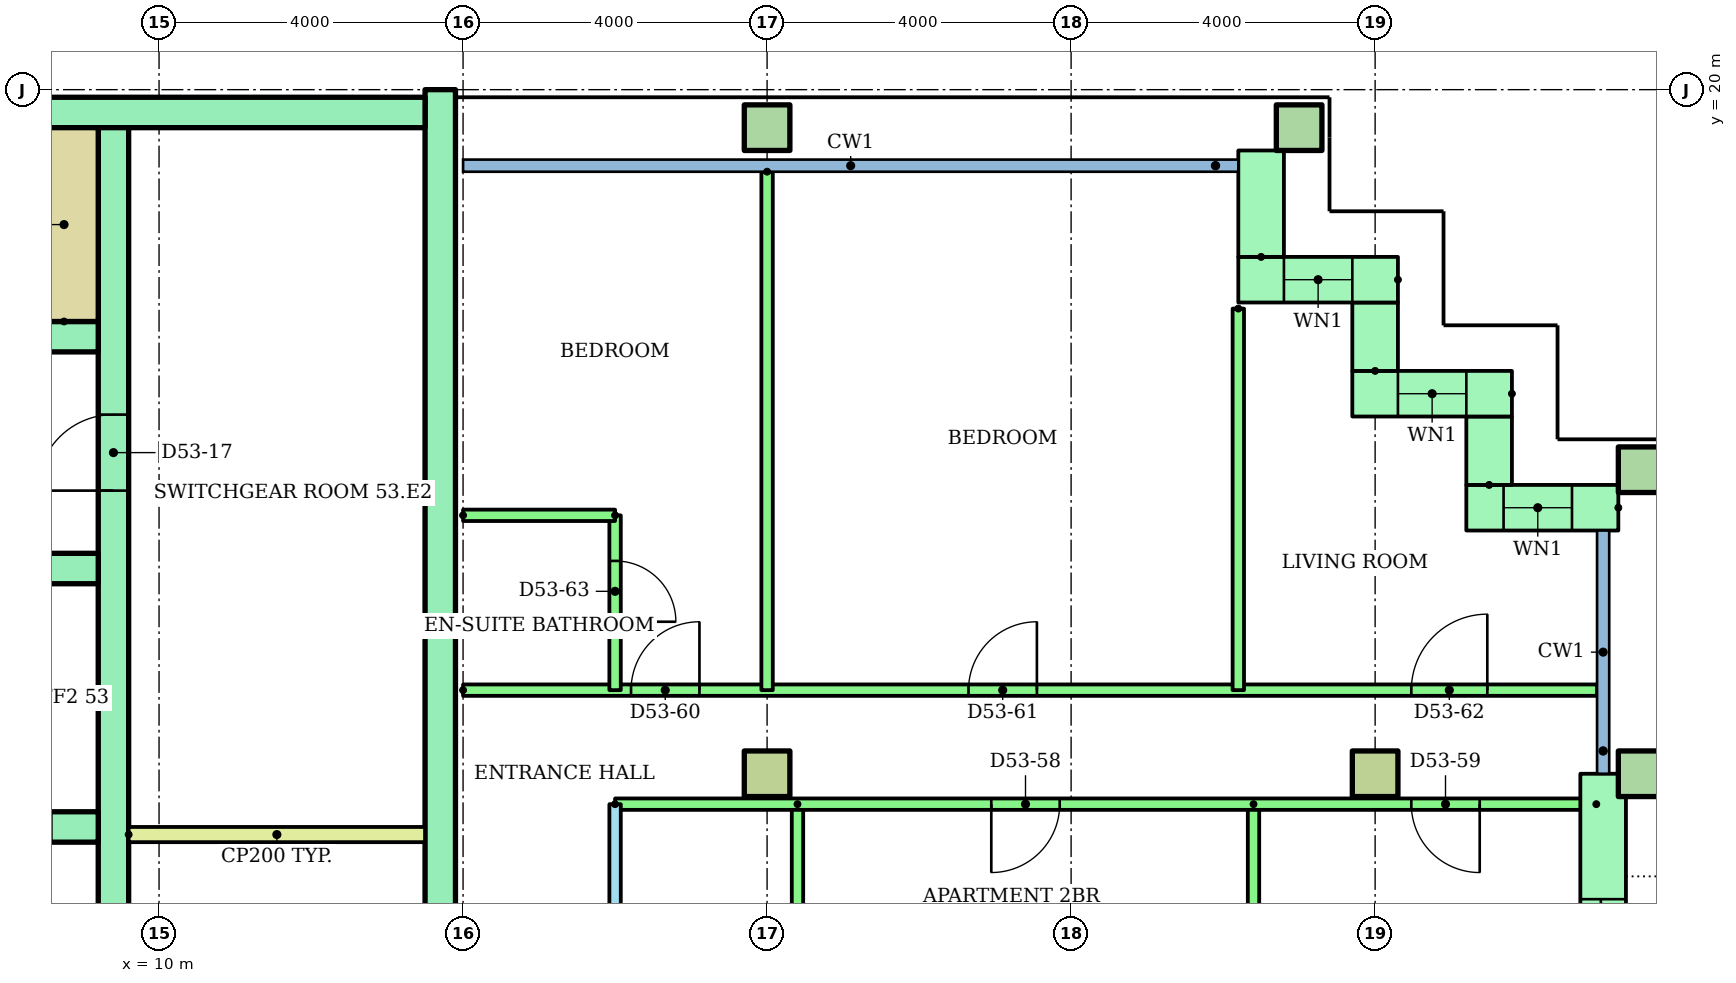
"""IFC4 building model, lengths in metres.
Left out: names, types, materials, properties, quantities, classifications, styles, units other than length and angle.
Written with IfcOpenShell. Run it as: python <this file> out.ifc"""

import sys

from ifc_helpers import new_model, si_unit, direction, frame, frame_2d, origin, origin_2d, place, context, subcontext, project, spatial, rectangle, hollow_rectangle, extrude, element, fill, save


model = new_model("IFC4")
c1 = context("Model", 3, precision=1e-05, world=origin(), true_north=direction((0.0, 1.0)))
c2 = subcontext(c1, "Body", "Model", "MODEL_VIEW")
j1 = project(units=[si_unit("LENGTHUNIT", "METRE"), si_unit("PLANEANGLEUNIT", "RADIAN")], contexts=[c1])
p1 = place(None, origin())
s1 = spatial("IfcSite", under=j1, at=p1, CompositionType="ELEMENT")
p2 = place(p1, origin())
s2 = spatial("IfcBuilding", under=s1, at=p2, CompositionType="ELEMENT")
p3 = place(p2, frame((0.0, 0.0, 207.6)))
s3 = spatial("IfcBuildingStorey", under=s2, at=p3, CompositionType="ELEMENT", Elevation=207.6)
for number, where in (
    (1, (18.0, 11.0, 0.0)),
    (2, (26.0, 11.0, 0.0)),
):
    element("IfcColumn", number, at=place(p3, frame(where)), inside=s3, PredefinedType="COLUMN", context=c2, shape_type="SweptSolid", body=[
        extrude(rectangle(XDim=0.6, YDim=0.6, at=origin_2d()), origin(), (0.0, 0.0, 1.0), 3.2),
    ])
for number, where in (
    (3, (29.5, 11.0, 0.0)),
    (4, (29.5, 15.0, 0.0)),
    (5, (18.0, 19.5, 0.0)),
    (6, (25.0, 19.5, 0.0)),
):
    element("IfcColumn", number, at=place(p3, frame(where)), inside=s3, PredefinedType="COLUMN", context=c2, shape_type="SweptSolid", body=[
        extrude(hollow_rectangle(XDim=0.6, YDim=0.6, WallThickness=0.03, at=origin_2d()), origin(), (0.0, 0.0, 1.0), 3.2),
    ])
p4 = place(p3, frame((29.2, 14.5, 0.0), z_axis=(0.0, 0.0, 1.0), x_axis=(-1.0, 0.0, 0.0)))
e7 = element("IfcWall", 7, at=p4, inside=s3, PredefinedType="STANDARD", context=c2, shape_type="SweptSolid", body=[
    extrude(rectangle(XDim=2.0, YDim=0.6, at=frame_2d((1.0, 0.0))), origin(), (0.0, 0.0, 1.0), 2.92),
])
p5 = place(p4, frame((0.61, 0.0, 0.9)))
e8 = element("IfcOpeningElement", 8, at=p5, cuts=e7, PredefinedType="OPENING", context=c2, shape_type="SweptSolid", body=[
    extrude(rectangle(XDim=0.9, YDim=1.5, at=frame_2d((0.45, 0.75))), frame((0.0, 0.31, 0.0), z_axis=(0.0, -1.0, 0.0), x_axis=(1.0, 0.0, 0.0)), (0.0, 0.0, 1.0), 0.62),
])
p6 = place(p3, frame((27.5, 14.8, 0.0), z_axis=(0.0, 0.0, 1.0), x_axis=(0.0, 1.0, 0.0)))
e9 = element("IfcWall", 9, at=p6, inside=s3, PredefinedType="STANDARD", context=c2, shape_type="SweptSolid", body=[
    extrude(rectangle(XDim=0.9, YDim=0.6, at=frame_2d((0.45, 0.0))), origin(), (0.0, 0.0, 1.0), 2.92),
])
p7 = place(p3, frame((27.8, 16.0, 0.0), z_axis=(0.0, 0.0, 1.0), x_axis=(-1.0, 0.0, 0.0)))
e10 = element("IfcWall", 10, at=p7, inside=s3, PredefinedType="STANDARD", context=c2, shape_type="SweptSolid", body=[
    extrude(rectangle(XDim=2.1, YDim=0.6, at=frame_2d((1.05, 0.0))), origin(), (0.0, 0.0, 1.0), 2.92),
])
p8 = place(p7, frame((0.6, 0.0, 0.9)))
e11 = element("IfcOpeningElement", 11, at=p8, cuts=e10, PredefinedType="OPENING", context=c2, shape_type="SweptSolid", body=[
    extrude(rectangle(XDim=0.9, YDim=1.5, at=frame_2d((0.45, 0.75))), frame((0.0, 0.31, 0.0), z_axis=(0.0, -1.0, 0.0), x_axis=(1.0, 0.0, 0.0)), (0.0, 0.0, 1.0), 0.62),
])
p9 = place(p3, frame((26.0, 16.3, 0.0), z_axis=(0.0, 0.0, 1.0), x_axis=(0.0, 1.0, 0.0)))
e12 = element("IfcWall", 12, at=p9, inside=s3, PredefinedType="STANDARD", context=c2, shape_type="SweptSolid", body=[
    extrude(rectangle(XDim=0.9, YDim=0.6, at=frame_2d((0.45, 0.0))), origin(), (0.0, 0.0, 1.0), 2.92),
])
p10 = place(p3, frame((26.3, 17.5, 0.0), z_axis=(0.0, 0.0, 1.0), x_axis=(-1.0, 0.0, 0.0)))
e13 = element("IfcWall", 13, at=p10, inside=s3, PredefinedType="STANDARD", context=c2, shape_type="SweptSolid", body=[
    extrude(rectangle(XDim=2.1, YDim=0.6, at=frame_2d((1.05, 0.0))), origin(), (0.0, 0.0, 1.0), 2.92),
])
p11 = place(p10, frame((0.6, 0.0, 0.9)))
e14 = element("IfcOpeningElement", 14, at=p11, cuts=e13, PredefinedType="OPENING", context=c2, shape_type="SweptSolid", body=[
    extrude(rectangle(XDim=0.9, YDim=1.5, at=frame_2d((0.45, 0.75))), frame((0.0, 0.31, 0.0), z_axis=(0.0, -1.0, 0.0), x_axis=(1.0, 0.0, 0.0)), (0.0, 0.0, 1.0), 0.62),
])
p12 = place(p3, frame((24.5, 17.8, 0.0), z_axis=(0.0, 0.0, 1.0), x_axis=(0.0, 1.0, 0.0)))
e15 = element("IfcWall", 15, at=p12, inside=s3, PredefinedType="STANDARD", context=c2, shape_type="SweptSolid", body=[
    extrude(rectangle(XDim=1.4, YDim=0.6, at=frame_2d((0.7, 0.0))), origin(), (0.0, 0.0, 1.0), 2.92),
])
p13 = place(p3, frame((29.0, 6.5, 0.0), z_axis=(0.0, 0.0, 1.0), x_axis=(0.0, 1.0, 0.0)))
e16 = element("IfcWall", 16, at=p13, inside=s3, PredefinedType="STANDARD", context=c2, shape_type="SweptSolid", body=[
    extrude(rectangle(XDim=4.5, YDim=0.6, at=frame_2d((2.25, 0.0))), origin(), (0.0, 0.0, 1.0), 2.92),
])
p14 = place(p13, frame((1.65, 0.0, 0.0)))
e17 = element("IfcOpeningElement", 17, at=p14, cuts=e16, PredefinedType="OPENING", context=c2, shape_type="SweptSolid", body=[
    extrude(rectangle(XDim=1.2, YDim=2.1, at=frame_2d((0.6, 1.05))), frame((0.0, 0.31, 0.0), z_axis=(0.0, -1.0, 0.0), x_axis=(1.0, 0.0, 0.0)), (0.0, 0.0, 1.0), 0.62),
])
p15 = place(p3, frame((13.7, 3.0, 0.0), z_axis=(0.0, 0.0, 1.0), x_axis=(0.0, 1.0, 0.0)))
e18 = element("IfcWall", 18, at=p15, inside=s3, PredefinedType="SHEAR", context=c2, shape_type="SweptSolid", body=[
    extrude(rectangle(XDim=17.0, YDim=0.4, at=frame_2d((8.5, 0.0))), origin(), (0.0, 0.0, 1.0), 2.92),
])
p16 = place(p3, frame((-13.5, 19.7, 0.0)))
e19 = element("IfcWall", 19, at=p16, inside=s3, PredefinedType="SHEAR", context=c2, shape_type="SweptSolid", body=[
    extrude(rectangle(XDim=27.0, YDim=0.4, at=frame_2d((13.5, 0.0))), origin(), (0.0, 0.0, 1.0), 2.92),
])
p17 = place(p3, frame((9.4, 6.8, 0.0), z_axis=(0.0, 0.0, 1.0), x_axis=(0.0, 1.0, 0.0)))
e20 = element("IfcWall", 20, at=p17, inside=s3, PredefinedType="SHEAR", context=c2, shape_type="SweptSolid", body=[
    extrude(rectangle(XDim=12.7, YDim=0.4, at=frame_2d((6.35, 0.0))), origin(), (0.0, 0.0, 1.0), 2.92),
])
p18 = place(p17, frame((1.15, 0.0, 0.0)))
e21 = element("IfcOpeningElement", 21, at=p18, cuts=e20, PredefinedType="OPENING", context=c2, shape_type="SweptSolid", body=[
    extrude(rectangle(XDim=1.0, YDim=2.1, at=frame_2d((0.5, 1.05))), frame((0.0, 0.21, 0.0), z_axis=(0.0, -1.0, 0.0), x_axis=(1.0, 0.0, 0.0)), (0.0, 0.0, 1.0), 0.42),
])
p19 = place(p17, frame((7.925, 0.0, 0.0)))
e22 = element("IfcOpeningElement", 22, at=p19, cuts=e20, PredefinedType="OPENING", context=c2, shape_type="SweptSolid", body=[
    extrude(rectangle(XDim=1.0, YDim=2.1, at=frame_2d((0.5, 1.05))), frame((0.0, 0.21, 0.0), z_axis=(0.0, -1.0, 0.0), x_axis=(1.0, 0.0, 0.0)), (0.0, 0.0, 1.0), 0.42),
])
p20 = place(p3, frame((1.2, 10.3, 0.0)))
e23 = element("IfcWall", 23, at=p20, inside=s3, PredefinedType="SHEAR", context=c2, shape_type="SweptSolid", body=[
    extrude(rectangle(XDim=8.0, YDim=0.4, at=frame_2d((4.0, 0.0))), origin(), (0.0, 0.0, 1.0), 2.92),
])
p21 = place(p20, frame((3.55, 0.0, 0.0)))
e24 = element("IfcOpeningElement", 24, at=p21, cuts=e23, PredefinedType="OPENING", context=c2, shape_type="SweptSolid", body=[
    extrude(rectangle(XDim=1.1, YDim=2.1, at=frame_2d((0.55, 1.05))), frame((0.0, 0.21, 0.0), z_axis=(0.0, -1.0, 0.0), x_axis=(1.0, 0.0, 0.0)), (0.0, 0.0, 1.0), 0.42),
])
p22 = place(p20, frame((6.283, 0.0, 0.0)))
e25 = element("IfcOpeningElement", 25, at=p22, cuts=e23, PredefinedType="OPENING", context=c2, shape_type="SweptSolid", body=[
    extrude(rectangle(XDim=1.1, YDim=2.1, at=frame_2d((0.55, 1.05))), frame((0.0, 0.21, 0.0), z_axis=(0.0, -1.0, 0.0), x_axis=(1.0, 0.0, 0.0)), (0.0, 0.0, 1.0), 0.42),
])
p23 = place(p20, frame((0.867, 0.0, 0.0)))
e26 = element("IfcOpeningElement", 26, at=p23, cuts=e23, PredefinedType="OPENING", context=c2, shape_type="SweptSolid", body=[
    extrude(rectangle(XDim=1.0, YDim=2.1, at=frame_2d((0.5, 1.05))), frame((0.0, 0.21, 0.0), z_axis=(0.0, -1.0, 0.0), x_axis=(1.0, 0.0, 0.0)), (0.0, 0.0, 1.0), 0.42),
])
p24 = place(p3, frame((1.2, 13.7, 0.0)))
e27 = element("IfcWall", 27, at=p24, inside=s3, PredefinedType="SHEAR", context=c2, shape_type="SweptSolid", body=[
    extrude(rectangle(XDim=8.0, YDim=0.4, at=frame_2d((4.0, 0.0))), origin(), (0.0, 0.0, 1.0), 2.92),
])
p25 = place(p3, frame((-9.2, 16.75, 0.0)))
e28 = element("IfcWall", 28, at=p25, inside=s3, PredefinedType="SHEAR", context=c2, shape_type="SweptSolid", body=[
    extrude(rectangle(XDim=18.4, YDim=0.4, at=frame_2d((9.2, 0.0))), origin(), (0.0, 0.0, 1.0), 2.92),
])
p26 = place(p25, frame((0.1, 0.0, 0.0)))
e29 = element("IfcOpeningElement", 29, at=p26, cuts=e28, PredefinedType="OPENING", context=c2, shape_type="SweptSolid", body=[
    extrude(rectangle(XDim=0.95, YDim=2.1, at=frame_2d((0.475, 1.05))), frame((0.0, 0.21, 0.0), z_axis=(0.0, -1.0, 0.0), x_axis=(1.0, 0.0, 0.0)), (0.0, 0.0, 1.0), 0.42),
])
p27 = place(p25, frame((6.1, 0.0, 0.0)))
e30 = element("IfcOpeningElement", 30, at=p27, cuts=e28, PredefinedType="OPENING", context=c2, shape_type="SweptSolid", body=[
    extrude(rectangle(XDim=0.95, YDim=2.1, at=frame_2d((0.475, 1.05))), frame((0.0, 0.21, 0.0), z_axis=(0.0, -1.0, 0.0), x_axis=(1.0, 0.0, 0.0)), (0.0, 0.0, 1.0), 0.42),
])
p28 = place(p25, frame((12.1, 0.0, 0.0)))
e31 = element("IfcOpeningElement", 31, at=p28, cuts=e28, PredefinedType="OPENING", context=c2, shape_type="SweptSolid", body=[
    extrude(rectangle(XDim=0.95, YDim=2.1, at=frame_2d((0.475, 1.05))), frame((0.0, 0.21, 0.0), z_axis=(0.0, -1.0, 0.0), x_axis=(1.0, 0.0, 0.0)), (0.0, 0.0, 1.0), 0.42),
])
p29 = place(p3, frame((8.75, 16.95, 0.0), z_axis=(0.0, 0.0, 1.0), x_axis=(0.0, 1.0, 0.0)))
e32 = element("IfcWall", 32, at=p29, inside=s3, PredefinedType="SHEAR", context=c2, shape_type="SweptSolid", body=[
    extrude(rectangle(XDim=2.55, YDim=0.9, at=frame_2d((1.275, 0.0))), origin(), (0.0, 0.0, 1.0), 2.92),
])
p30 = place(p3, frame((9.6, 10.2, 0.0)))
e33 = element("IfcWall", 33, at=p30, inside=s3, PredefinedType="PARTITIONING", context=c2, shape_type="SweptSolid", body=[
    extrude(rectangle(XDim=3.9, YDim=0.2, at=frame_2d((1.95, 0.0))), origin(), (0.0, 0.0, 1.0), 2.92),
])
p31 = place(p3, frame((16.0, 10.6, 0.0), z_axis=(0.0, 0.0, 1.0), x_axis=(0.0, -1.0, 0.0)))
e34 = element("IfcWall", 34, at=p31, inside=s3, PredefinedType="PARTITIONING", context=c2, shape_type="SweptSolid", body=[
    extrude(rectangle(XDim=9.2, YDim=0.15, at=frame_2d((4.6, 0.0))), origin(), (0.0, 0.0, 1.0), 2.4),
])
p32 = place(p31, frame((6.25, 0.0, 0.0)))
e35 = element("IfcOpeningElement", 35, at=p32, cuts=e34, PredefinedType="OPENING", context=c2, shape_type="SweptSolid", body=[
    extrude(rectangle(XDim=0.9, YDim=2.1, at=frame_2d((0.45, 1.05))), frame((0.0, 0.085, 0.0), z_axis=(0.0, -1.0, 0.0), x_axis=(1.0, 0.0, 0.0)), (0.0, 0.0, 1.0), 0.17),
])
p33 = place(p31, frame((1.7, 0.0, 0.0)))
e36 = element("IfcOpeningElement", 36, at=p33, cuts=e34, PredefinedType="OPENING", context=c2, shape_type="SweptSolid", body=[
    extrude(rectangle(XDim=0.8, YDim=2.1, at=frame_2d((0.4, 1.05))), frame((0.0, 0.085, 0.0), z_axis=(0.0, -1.0, 0.0), x_axis=(1.0, 0.0, 0.0)), (0.0, 0.0, 1.0), 0.17),
])
for number, where, z_axis, x_axis in (
    (37, (18.4, 10.6, 0.0), (0.0, 0.0, 1.0), (0.0, -1.0, 0.0)),
    (38, (24.4, 10.6, 0.0), (0.0, 0.0, 1.0), (0.0, -1.0, 0.0)),
):
    element("IfcWall", number, at=place(p3, frame(where, z_axis=z_axis, x_axis=x_axis)), inside=s3, PredefinedType="PARTITIONING", context=c2, shape_type="SweptSolid", body=[
        extrude(rectangle(XDim=9.2, YDim=0.15, at=frame_2d((4.6, 0.0))), origin(), (0.0, 0.0, 1.0), 2.4),
    ])
p34 = place(p3, frame((28.91, 10.6, 0.0), z_axis=(0.0, 0.0, 1.0), x_axis=(-1.0, 0.0, 0.0)))
e39 = element("IfcWall", 39, at=p34, inside=s3, PredefinedType="PARTITIONING", context=c2, shape_type="SweptSolid", body=[
    extrude(rectangle(XDim=12.91, YDim=0.15, at=frame_2d((6.455, 0.0))), origin(), (0.0, 0.0, 1.0), 2.4),
])
p35 = place(p34, frame((7.06, 0.0, 0.0)))
e40 = element("IfcOpeningElement", 40, at=p35, cuts=e39, PredefinedType="OPENING", context=c2, shape_type="SweptSolid", body=[
    extrude(rectangle(XDim=0.9, YDim=2.1, at=frame_2d((0.45, 1.05))), frame((0.0, 0.085, 0.0), z_axis=(0.0, -1.0, 0.0), x_axis=(1.0, 0.0, 0.0)), (0.0, 0.0, 1.0), 0.17),
])
p36 = place(p34, frame((1.534, 0.0, 0.0)))
e41 = element("IfcOpeningElement", 41, at=p36, cuts=e39, PredefinedType="OPENING", context=c2, shape_type="SweptSolid", body=[
    extrude(rectangle(XDim=0.9, YDim=2.1, at=frame_2d((0.45, 1.05))), frame((0.0, 0.085, 0.0), z_axis=(0.0, -1.0, 0.0), x_axis=(1.0, 0.0, 0.0)), (0.0, 0.0, 1.0), 0.17),
])
p37 = place(p3, frame((14.0, 12.1, 0.0)))
e42 = element("IfcWall", 42, at=p37, inside=s3, PredefinedType="PARTITIONING", context=c2, shape_type="SweptSolid", body=[
    extrude(rectangle(XDim=14.92, YDim=0.15, at=frame_2d((7.46, 0.0))), origin(), (0.0, 0.0, 1.0), 2.4),
])
p38 = place(p37, frame((2.21, 0.0, 0.0)))
e43 = element("IfcOpeningElement", 43, at=p38, cuts=e42, PredefinedType="OPENING", context=c2, shape_type="SweptSolid", body=[
    extrude(rectangle(XDim=0.9, YDim=2.1, at=frame_2d((0.45, 1.05))), frame((0.0, 0.085, 0.0), z_axis=(0.0, -1.0, 0.0), x_axis=(1.0, 0.0, 0.0)), (0.0, 0.0, 1.0), 0.17),
])
p39 = place(p37, frame((6.65, 0.0, 0.0)))
e44 = element("IfcOpeningElement", 44, at=p39, cuts=e42, PredefinedType="OPENING", context=c2, shape_type="SweptSolid", body=[
    extrude(rectangle(XDim=0.9, YDim=2.1, at=frame_2d((0.45, 1.05))), frame((0.0, 0.085, 0.0), z_axis=(0.0, -1.0, 0.0), x_axis=(1.0, 0.0, 0.0)), (0.0, 0.0, 1.0), 0.17),
])
p40 = place(p37, frame((12.476, 0.0, 0.0)))
e45 = element("IfcOpeningElement", 45, at=p40, cuts=e42, PredefinedType="OPENING", context=c2, shape_type="SweptSolid", body=[
    extrude(rectangle(XDim=1.0, YDim=2.1, at=frame_2d((0.5, 1.05))), frame((0.0, 0.085, 0.0), z_axis=(0.0, -1.0, 0.0), x_axis=(1.0, 0.0, 0.0)), (0.0, 0.0, 1.0), 0.17),
])
p41 = place(p3, frame((18.0, 18.921, 0.0), z_axis=(0.0, 0.0, 1.0), x_axis=(0.0, -1.0, 0.0)))
e46 = element("IfcWall", 46, at=p41, inside=s3, PredefinedType="PARTITIONING", context=c2, shape_type="SweptSolid", body=[
    extrude(rectangle(XDim=6.821, YDim=0.15, at=frame_2d((3.41, 0.0))), origin(), (0.0, 0.0, 1.0), 2.4),
])
p42 = place(p3, frame((24.2, 17.12, 0.0), z_axis=(0.0, 0.0, 1.0), x_axis=(0.0, -1.0, 0.0)))
e47 = element("IfcWall", 47, at=p42, inside=s3, PredefinedType="PARTITIONING", context=c2, shape_type="SweptSolid", body=[
    extrude(rectangle(XDim=5.02, YDim=0.15, at=frame_2d((2.51, 0.0))), origin(), (0.0, 0.0, 1.0), 2.4),
])
p43 = place(p3, frame((16.0, 14.4, 0.0), z_axis=(0.0, 0.0, 1.0), x_axis=(0.0, -1.0, 0.0)))
e48 = element("IfcWall", 48, at=p43, inside=s3, PredefinedType="PARTITIONING", context=c2, shape_type="SweptSolid", body=[
    extrude(rectangle(XDim=2.3, YDim=0.15, at=frame_2d((1.15, 0.0))), origin(), (0.0, 0.0, 1.0), 2.4),
])
p44 = place(p43, frame((0.6, 0.0, 0.0)))
e49 = element("IfcOpeningElement", 49, at=p44, cuts=e48, PredefinedType="OPENING", context=c2, shape_type="SweptSolid", body=[
    extrude(rectangle(XDim=0.8, YDim=2.1, at=frame_2d((0.4, 1.05))), frame((0.0, 0.085, 0.0), z_axis=(0.0, -1.0, 0.0), x_axis=(1.0, 0.0, 0.0)), (0.0, 0.0, 1.0), 0.17),
])
p45 = place(p3, frame((14.0, 14.4, 0.0)))
e50 = element("IfcWall", 50, at=p45, inside=s3, PredefinedType="PARTITIONING", context=c2, shape_type="SweptSolid", body=[
    extrude(rectangle(XDim=2.0, YDim=0.15, at=frame_2d((1.0, 0.0))), origin(), (0.0, 0.0, 1.0), 2.4),
])
p46 = place(p5, origin())
e51 = element("IfcWindow", 51, at=p46, inside=s3, PartitioningType="SINGLE_PANEL", PredefinedType="WINDOW", context=c2, shape_type="SweptSolid", body=[
    extrude(rectangle(XDim=0.9, YDim=1.5, at=frame_2d((0.45, 0.75))), frame((0.0, 0.03, 0.0), z_axis=(0.0, -1.0, 0.0), x_axis=(1.0, 0.0, 0.0)), (0.0, 0.0, 1.0), 0.06),
])
fill(e8, e51)
p47 = place(p8, origin())
e52 = element("IfcWindow", 52, at=p47, inside=s3, PartitioningType="SINGLE_PANEL", PredefinedType="WINDOW", context=c2, shape_type="SweptSolid", body=[
    extrude(rectangle(XDim=0.9, YDim=1.5, at=frame_2d((0.45, 0.75))), frame((0.0, 0.03, 0.0), z_axis=(0.0, -1.0, 0.0), x_axis=(1.0, 0.0, 0.0)), (0.0, 0.0, 1.0), 0.06),
])
fill(e11, e52)
p48 = place(p11, origin())
e53 = element("IfcWindow", 53, at=p48, inside=s3, PartitioningType="SINGLE_PANEL", PredefinedType="WINDOW", context=c2, shape_type="SweptSolid", body=[
    extrude(rectangle(XDim=0.9, YDim=1.5, at=frame_2d((0.45, 0.75))), frame((0.0, 0.03, 0.0), z_axis=(0.0, -1.0, 0.0), x_axis=(1.0, 0.0, 0.0)), (0.0, 0.0, 1.0), 0.06),
])
fill(e14, e53)
p49 = place(p19, origin())
e54 = element("IfcDoor", 54, at=p49, inside=s3, OperationType="SINGLE_SWING_LEFT", PredefinedType="DOOR", context=c2, shape_type="SweptSolid", body=[
    extrude(rectangle(XDim=1.0, YDim=2.1, at=frame_2d((0.5, 1.05))), frame((0.0, 0.025, 0.0), z_axis=(0.0, -1.0, 0.0), x_axis=(1.0, 0.0, 0.0)), (0.0, 0.0, 1.0), 0.05),
])
fill(e22, e54)
p50 = place(p35, origin())
e55 = element("IfcDoor", 55, at=p50, inside=s3, OperationType="SINGLE_SWING_RIGHT", PredefinedType="DOOR", context=c2, shape_type="SweptSolid", body=[
    extrude(rectangle(XDim=0.9, YDim=2.1, at=frame_2d((0.45, 1.05))), frame((0.0, 0.025, 0.0), z_axis=(0.0, -1.0, 0.0), x_axis=(1.0, 0.0, 0.0)), (0.0, 0.0, 1.0), 0.05),
])
fill(e40, e55)
p51 = place(p36, origin())
e56 = element("IfcDoor", 56, at=p51, inside=s3, OperationType="SINGLE_SWING_LEFT", PredefinedType="DOOR", context=c2, shape_type="SweptSolid", body=[
    extrude(rectangle(XDim=0.9, YDim=2.1, at=frame_2d((0.45, 1.05))), frame((0.0, 0.025, 0.0), z_axis=(0.0, -1.0, 0.0), x_axis=(1.0, 0.0, 0.0)), (0.0, 0.0, 1.0), 0.05),
])
fill(e41, e56)
p52 = place(p38, origin())
e57 = element("IfcDoor", 57, at=p52, inside=s3, OperationType="SINGLE_SWING_RIGHT", PredefinedType="DOOR", context=c2, shape_type="SweptSolid", body=[
    extrude(rectangle(XDim=0.9, YDim=2.1, at=frame_2d((0.45, 1.05))), frame((0.0, 0.025, 0.0), z_axis=(0.0, -1.0, 0.0), x_axis=(1.0, 0.0, 0.0)), (0.0, 0.0, 1.0), 0.05),
])
fill(e43, e57)
p53 = place(p39, origin())
e58 = element("IfcDoor", 58, at=p53, inside=s3, OperationType="SINGLE_SWING_RIGHT", PredefinedType="DOOR", context=c2, shape_type="SweptSolid", body=[
    extrude(rectangle(XDim=0.9, YDim=2.1, at=frame_2d((0.45, 1.05))), frame((0.0, 0.025, 0.0), z_axis=(0.0, -1.0, 0.0), x_axis=(1.0, 0.0, 0.0)), (0.0, 0.0, 1.0), 0.05),
])
fill(e44, e58)
p54 = place(p40, origin())
e59 = element("IfcDoor", 59, at=p54, inside=s3, OperationType="SINGLE_SWING_RIGHT", PredefinedType="DOOR", context=c2, shape_type="SweptSolid", body=[
    extrude(rectangle(XDim=1.0, YDim=2.1, at=frame_2d((0.5, 1.05))), frame((0.0, 0.025, 0.0), z_axis=(0.0, -1.0, 0.0), x_axis=(1.0, 0.0, 0.0)), (0.0, 0.0, 1.0), 0.05),
])
fill(e45, e59)
p55 = place(p44, origin())
e60 = element("IfcDoor", 60, at=p55, inside=s3, OperationType="SINGLE_SWING_RIGHT", PredefinedType="DOOR", context=c2, shape_type="SweptSolid", body=[
    extrude(rectangle(XDim=0.8, YDim=2.1, at=frame_2d((0.4, 1.05))), frame((0.0, 0.025, 0.0), z_axis=(0.0, -1.0, 0.0), x_axis=(1.0, 0.0, 0.0)), (0.0, 0.0, 1.0), 0.05),
])
fill(e49, e60)
p56 = place(p14, origin())
e61 = element("IfcDoor", 61, at=p56, inside=s3, OperationType="SLIDING_TO_LEFT", PredefinedType="DOOR", context=c2, shape_type="SweptSolid", body=[
    extrude(rectangle(XDim=1.2, YDim=2.1, at=frame_2d((0.6, 1.05))), frame((0.0, 0.025, 0.0), z_axis=(0.0, -1.0, 0.0), x_axis=(1.0, 0.0, 0.0)), (0.0, 0.0, 1.0), 0.05),
])
fill(e17, e61)
save(model, sys.argv[1])
